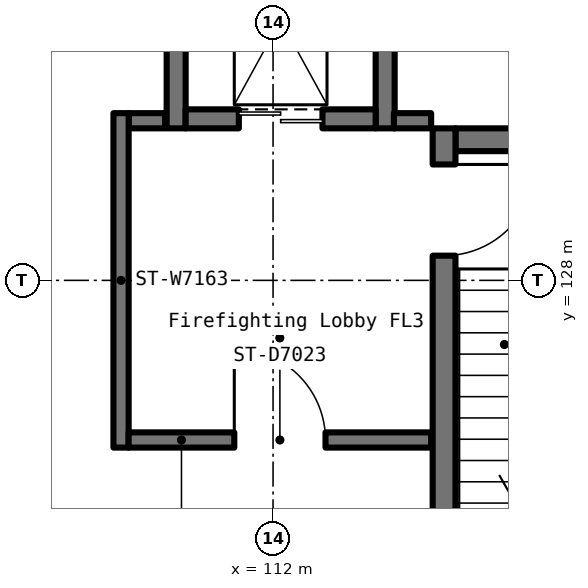
"""IFC4 building model, lengths in metres.
Left out: names, types, materials, properties, quantities, classifications, styles, units other than length and angle.
Written with IfcOpenShell. Run it as: python <this file> out.ifc"""

import sys

from ifc_helpers import new_model, si_unit, direction, frame, frame_2d, origin, place, context, subcontext, project, spatial, rectangle, extrude, element, fill, save


model = new_model("IFC4")
c1 = context("Model", 3, precision=1e-05, world=origin(), true_north=direction((0.0, 1.0)))
c2 = subcontext(c1, "Body", "Model", "MODEL_VIEW")
j1 = project(units=[si_unit("LENGTHUNIT", "METRE"), si_unit("PLANEANGLEUNIT", "RADIAN")], contexts=[c1])
p1 = place(None, origin())
s1 = spatial("IfcSite", under=j1, at=p1, CompositionType="ELEMENT")
p2 = place(p1, origin())
s2 = spatial("IfcBuilding", under=s1, at=p2, CompositionType="ELEMENT")
p3 = place(p2, frame((0.0, 0.0, -10.5)))
s3 = spatial("IfcBuildingStorey", under=s2, at=p3, CompositionType="ELEMENT", Elevation=-10.5)
p4 = place(p3, frame((117.7, 129.85, 0.0), z_axis=(0.0, 0.0, 1.0), x_axis=(-1.0, 0.0, 0.0)))
e1 = element("IfcWall", 1, at=p4, inside=s3, PredefinedType="SOLIDWALL", context=c2, shape_type="SweptSolid", body=[
    extrude(rectangle(XDim=3.3, YDim=0.3, at=frame_2d((1.65, 0.0))), origin(), (0.0, 0.0, 1.0), 4.5),
])
p5 = place(p3, frame((114.25, 130.0, 0.0), z_axis=(0.0, 0.0, 1.0), x_axis=(0.0, -1.0, 0.0)))
e2 = element("IfcWall", 2, at=p5, inside=s3, PredefinedType="SOLIDWALL", context=c2, shape_type="SweptSolid", body=[
    extrude(rectangle(XDim=9.0, YDim=0.3, at=frame_2d((4.5, 0.0))), origin(), (0.0, 0.0, 1.0), 4.5),
])
p6 = place(p5, frame((0.475, 0.0, 0.0)))
e3 = element("IfcOpeningElement", 3, at=p6, cuts=e2, PredefinedType="OPENING", context=c2, shape_type="SweptSolid", body=[
    extrude(rectangle(XDim=1.2, YDim=2.1, at=frame_2d((0.6, 1.05))), frame((0.0, 0.162, 0.0), z_axis=(0.0, -1.0, 0.0), x_axis=(1.0, 0.0, 0.0)), (0.0, 0.0, 1.0), 0.324),
])
for number, where, z_axis, x_axis in (
    (4, (113.475, 130.0, 0.0), (0.0, 0.0, 1.0), (0.0, 1.0, 0.0)),
    (5, (110.725, 134.0, 0.0), (0.0, 0.0, 1.0), (0.0, -1.0, 0.0)),
):
    element("IfcWall", number, at=place(p3, frame(where, z_axis=z_axis, x_axis=x_axis)), inside=s3, PredefinedType="SOLIDWALL", context=c2, shape_type="SweptSolid", body=[
        extrude(rectangle(XDim=4.0, YDim=0.25, at=frame_2d((2.0, 0.0))), origin(), (0.0, 0.0, 1.0), 4.5),
    ])
p7 = place(p3, frame((110.85, 130.125, 0.0), z_axis=(0.0, 0.0, 1.0), x_axis=(1.0, 0.0, 0.0)))
e6 = element("IfcWall", 6, at=p7, inside=s3, PredefinedType="SOLIDWALL", context=c2, shape_type="SweptSolid", body=[
    extrude(rectangle(XDim=2.5, YDim=0.25, at=frame_2d((1.25, 0.0))), origin(), (0.0, 0.0, 1.0), 4.5),
])
p8 = place(p7, frame((0.7, 0.0, 0.0)))
e7 = element("IfcOpeningElement", 7, at=p8, cuts=e6, PredefinedType="OPENING", context=c2, shape_type="SweptSolid", body=[
    extrude(rectangle(XDim=1.1, YDim=2.1, at=frame_2d((0.55, 1.05))), frame((0.0, 0.137, 0.0), z_axis=(0.0, -1.0, 0.0), x_axis=(1.0, 0.0, 0.0)), (0.0, 0.0, 1.0), 0.274),
])
p9 = place(p3, frame((114.08, 130.1, 0.0), z_axis=(0.0, 0.0, 1.0), x_axis=(-1.0, 0.0, 0.0)))
e8 = element("IfcWall", 8, at=p9, inside=s3, PredefinedType="PARTITIONING", context=c2, shape_type="SweptSolid", body=[
    extrude(rectangle(XDim=0.49, YDim=0.2, at=frame_2d((0.245, 0.0))), origin(), (0.0, 0.0, 1.0), 4.2),
])
p10 = place(p3, frame((110.58, 130.1, 0.0), z_axis=(0.0, 0.0, 1.0), x_axis=(-1.0, 0.0, 0.0)))
e9 = element("IfcWall", 9, at=p10, inside=s3, PredefinedType="PARTITIONING", context=c2, shape_type="SweptSolid", body=[
    extrude(rectangle(XDim=0.48, YDim=0.2, at=frame_2d((0.24, 0.0))), origin(), (0.0, 0.0, 1.0), 4.2),
])
p11 = place(p3, frame((110.0, 130.2, 0.0), z_axis=(0.0, 0.0, 1.0), x_axis=(0.0, -1.0, 0.0)))
e10 = element("IfcWall", 10, at=p11, inside=s3, PredefinedType="PARTITIONING", context=c2, shape_type="SweptSolid", body=[
    extrude(rectangle(XDim=4.4, YDim=0.2, at=frame_2d((2.2, 0.0))), origin(), (0.0, 0.0, 1.0), 4.2),
])
p12 = place(p3, frame((110.1, 125.9, 0.0), z_axis=(0.0, 0.0, 1.0), x_axis=(1.0, 0.0, 0.0)))
e11 = element("IfcWall", 11, at=p12, inside=s3, PredefinedType="PARTITIONING", context=c2, shape_type="SweptSolid", body=[
    extrude(rectangle(XDim=3.98, YDim=0.2, at=frame_2d((1.99, 0.0))), origin(), (0.0, 0.0, 1.0), 4.2),
])
p13 = place(p12, frame((1.39, 0.0, 0.0)))
e12 = element("IfcOpeningElement", 12, at=p13, cuts=e11, PredefinedType="OPENING", context=c2, shape_type="SweptSolid", body=[
    extrude(rectangle(XDim=1.2, YDim=2.1, at=frame_2d((0.6, 1.05))), frame((0.0, 0.112, 0.0), z_axis=(0.0, -1.0, 0.0), x_axis=(1.0, 0.0, 0.0)), (0.0, 0.0, 1.0), 0.224),
])
p14 = place(p6, origin())
e13 = element("IfcDoor", 13, at=p14, inside=s3, OperationType="SINGLE_SWING_LEFT", PredefinedType="DOOR", context=c2, shape_type="SweptSolid", body=[
    extrude(rectangle(XDim=1.2, YDim=2.1, at=frame_2d((0.6, 1.05))), frame((0.0, 0.025, 0.0), z_axis=(0.0, -1.0, 0.0), x_axis=(1.0, 0.0, 0.0)), (0.0, 0.0, 1.0), 0.05),
])
fill(e3, e13)
p15 = place(p8, origin())
e14 = element("IfcDoor", 14, at=p15, inside=s3, OperationType="DOUBLE_DOOR_SLIDING", PredefinedType="DOOR", context=c2, shape_type="SweptSolid", body=[
    extrude(rectangle(XDim=1.1, YDim=2.1, at=frame_2d((0.55, 1.05))), frame((0.0, 0.025, 0.0), z_axis=(0.0, -1.0, 0.0), x_axis=(1.0, 0.0, 0.0)), (0.0, 0.0, 1.0), 0.05),
])
fill(e7, e14)
p16 = place(p13, origin())
e15 = element("IfcDoor", 15, at=p16, inside=s3, OperationType="SINGLE_SWING_LEFT", PredefinedType="DOOR", context=c2, shape_type="SweptSolid", body=[
    extrude(rectangle(XDim=1.2, YDim=2.1, at=frame_2d((0.6, 1.05))), frame((0.0, 0.025, 0.0), z_axis=(0.0, -1.0, 0.0), x_axis=(1.0, 0.0, 0.0)), (0.0, 0.0, 1.0), 0.05),
])
fill(e12, e15)
save(model, sys.argv[1])
